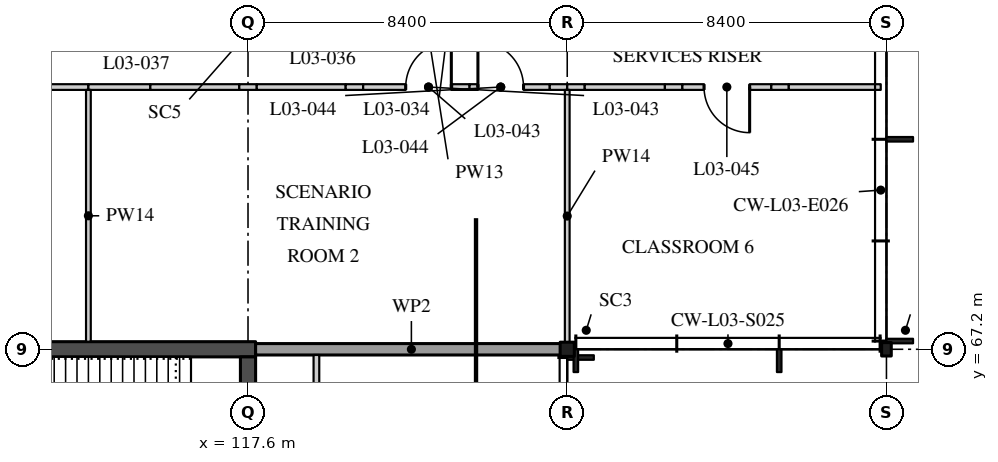
"""IFC4 building model, lengths in metres.
Left out: names, types, materials, properties, quantities, classifications, styles, units other than length and angle.
Written with IfcOpenShell. Run it as: python <this file> out.ifc"""

import sys

from ifc_helpers import new_model, si_unit, direction, frame, frame_2d, origin, origin_2d, place, context, subcontext, project, spatial, rectangle, i_section, extrude, element, fill, save


model = new_model("IFC4")
c1 = context("Model", 3, precision=1e-05, world=origin(), true_north=direction((0.0, 1.0)))
c2 = subcontext(c1, "Body", "Model", "MODEL_VIEW")
j1 = project(units=[si_unit("LENGTHUNIT", "METRE"), si_unit("PLANEANGLEUNIT", "RADIAN")], contexts=[c1])
p1 = place(None, origin())
s1 = spatial("IfcSite", under=j1, at=p1, CompositionType="ELEMENT")
p2 = place(p1, origin())
s2 = spatial("IfcBuilding", under=s1, at=p2, CompositionType="ELEMENT")
p3 = place(p2, frame((0.0, 0.0, 14.4)))
s3 = spatial("IfcBuildingStorey", under=s2, at=p3, CompositionType="ELEMENT", Elevation=14.4)
p4 = place(p3, frame((126.0, 67.2, 0.0), z_axis=(0.0, 0.0, 1.0), x_axis=(1.0, 0.0, 0.0)))
e1 = element("IfcColumn", 1, at=p4, inside=s3, PredefinedType="COLUMN", context=c2, shape_type="SweptSolid", body=[
    extrude(i_section(OverallWidth=0.373, OverallDepth=0.373, WebThickness=0.016, FlangeThickness=0.026, FilletRadius=0.015, at=origin_2d()), origin(), (0.0, 0.0, 1.0), 4.37),
])
p5 = place(p3, frame((134.4, 67.2, 0.0), z_axis=(0.0, 0.0, 1.0), x_axis=(1.0, 0.0, 0.0)))
e2 = element("IfcColumn", 2, at=p5, inside=s3, PredefinedType="COLUMN", context=c2, shape_type="SweptSolid", body=[
    extrude(i_section(OverallWidth=0.254, OverallDepth=0.353, WebThickness=0.01, FlangeThickness=0.016, FilletRadius=0.015, at=origin_2d()), origin(), (0.0, 0.0, 1.0), 4.37),
])
p6 = place(p3, frame((109.0, 67.2, 0.0), z_axis=(0.0, 0.0, 1.0), x_axis=(1.0, 0.0, 0.0)))
e3 = element("IfcWall", 3, at=p6, inside=s3, PredefinedType="SHEAR", context=c2, shape_type="SweptSolid", body=[
    extrude(rectangle(XDim=8.8, YDim=0.4, at=frame_2d((4.4, 0.0))), origin(), (0.0, 0.0, 1.0), 4.37),
])
p7 = place(p3, frame((117.6, 59.0, 0.0), z_axis=(0.0, 0.0, 1.0), x_axis=(0.0, 1.0, 0.0)))
e4 = element("IfcWall", 4, at=p7, inside=s3, PredefinedType="SHEAR", context=c2, shape_type="SweptSolid", body=[
    extrude(rectangle(XDim=8.0, YDim=0.4, at=frame_2d((4.0, 0.0))), origin(), (0.0, 0.0, 1.0), 4.37),
])
p8 = place(p7, frame((2.925, 0.0, 0.0)))
e5 = element("IfcOpeningElement", 5, at=p8, cuts=e4, PredefinedType="OPENING", context=c2, shape_type="SweptSolid", body=[
    extrude(rectangle(XDim=1.2, YDim=2.1, at=frame_2d((0.6, 1.05))), frame((0.0, 0.21, 0.0), z_axis=(0.0, -1.0, 0.0), x_axis=(1.0, 0.0, 0.0)), (0.0, 0.0, 1.0), 0.42),
])
p9 = place(p3, frame((119.4, 59.03, 0.0), z_axis=(0.0, 0.0, 1.0), x_axis=(0.0, 1.0, 0.0)))
e6 = element("IfcWall", 6, at=p9, inside=s3, PredefinedType="PARTITIONING", context=c2, shape_type="SweptSolid", body=[
    extrude(rectangle(XDim=8.02, YDim=0.15, at=frame_2d((4.01, 0.0))), origin(), (0.0, 0.0, 1.0), 4.37),
])
p10 = place(p9, frame((0.17, 0.0, 0.0)))
e7 = element("IfcOpeningElement", 7, at=p10, cuts=e6, PredefinedType="OPENING", context=c2, shape_type="SweptSolid", body=[
    extrude(rectangle(XDim=1.35, YDim=2.1, at=frame_2d((0.675, 1.05))), frame((0.0, 0.085, 0.0), z_axis=(0.0, -1.0, 0.0), x_axis=(1.0, 0.0, 0.0)), (0.0, 0.0, 1.0), 0.17),
])
p11 = place(p3, frame((111.77, 74.1, 0.0), z_axis=(0.0, 0.0, 1.0), x_axis=(1.0, 0.0, 0.0)))
e8 = element("IfcWall", 8, at=p11, inside=s3, PredefinedType="PARTITIONING", context=c2, shape_type="SweptSolid", body=[
    extrude(rectangle(XDim=1.63, YDim=0.15, at=frame_2d((0.815, 0.0))), origin(), (0.0, 0.0, 1.0), 3.895),
])
p12 = place(p3, frame((113.4, 74.1, 0.0), z_axis=(0.0, 0.0, 1.0), x_axis=(1.0, 0.0, 0.0)))
e9 = element("IfcWall", 9, at=p12, inside=s3, PredefinedType="PARTITIONING", context=c2, shape_type="SweptSolid", body=[
    extrude(rectangle(XDim=1.63, YDim=0.15, at=frame_2d((0.815, 0.0))), origin(), (0.0, 0.0, 1.0), 3.895),
])
p13 = place(p3, frame((115.03, 74.1, 0.0), z_axis=(0.0, 0.0, 1.0), x_axis=(1.0, 0.0, 0.0)))
e10 = element("IfcWall", 10, at=p13, inside=s3, PredefinedType="PARTITIONING", context=c2, shape_type="SweptSolid", body=[
    extrude(rectangle(XDim=2.34, YDim=0.15, at=frame_2d((1.17, 0.0))), origin(), (0.0, 0.0, 1.0), 4.37),
])
p14 = place(p3, frame((117.37, 74.1, 0.0), z_axis=(0.0, 0.0, 1.0), x_axis=(1.0, 0.0, 0.0)))
e11 = element("IfcWall", 11, at=p14, inside=s3, PredefinedType="PARTITIONING", context=c2, shape_type="SweptSolid", body=[
    extrude(rectangle(XDim=0.46, YDim=0.15, at=frame_2d((0.23, 0.0))), origin(), (0.0, 0.0, 1.0), 3.746),
])
p15 = place(p3, frame((117.83, 74.1, 0.0), z_axis=(0.0, 0.0, 1.0), x_axis=(1.0, 0.0, 0.0)))
e12 = element("IfcWall", 12, at=p15, inside=s3, PredefinedType="PARTITIONING", context=c2, shape_type="SweptSolid", body=[
    extrude(rectangle(XDim=2.34, YDim=0.15, at=frame_2d((1.17, 0.0))), origin(), (0.0, 0.0, 1.0), 4.37),
])
p16 = place(p3, frame((120.17, 74.1, 0.0), z_axis=(0.0, 0.0, 1.0), x_axis=(1.0, 0.0, 0.0)))
e13 = element("IfcWall", 13, at=p16, inside=s3, PredefinedType="PARTITIONING", context=c2, shape_type="SweptSolid", body=[
    extrude(rectangle(XDim=0.46, YDim=0.15, at=frame_2d((0.23, 0.0))), origin(), (0.0, 0.0, 1.0), 3.895),
])
p17 = place(p3, frame((120.63, 74.1, 0.0), z_axis=(0.0, 0.0, 1.0), x_axis=(1.0, 0.0, 0.0)))
e14 = element("IfcWall", 14, at=p17, inside=s3, PredefinedType="PARTITIONING", context=c2, shape_type="SweptSolid", body=[
    extrude(rectangle(XDim=2.34, YDim=0.15, at=frame_2d((1.17, 0.0))), origin(), (0.0, 0.0, 1.0), 4.37),
])
p18 = place(p17, frame((1.12, 0.0, 0.0)))
e15 = element("IfcOpeningElement", 15, at=p18, cuts=e14, PredefinedType="OPENING", context=c2, shape_type="SweptSolid", body=[
    extrude(rectangle(XDim=1.2, YDim=2.4, at=frame_2d((0.6, 1.2))), frame((0.0, 0.085, 0.0), z_axis=(0.0, -1.0, 0.0), x_axis=(1.0, 0.0, 0.0)), (0.0, 0.0, 1.0), 0.17),
])
p19 = place(p3, frame((122.97, 74.1, 0.0), z_axis=(0.0, 0.0, 1.0), x_axis=(1.0, 0.0, 0.0)))
e16 = element("IfcWall", 16, at=p19, inside=s3, PredefinedType="PARTITIONING", context=c2, shape_type="SweptSolid", body=[
    extrude(rectangle(XDim=0.46, YDim=0.15, at=frame_2d((0.23, 0.0))), origin(), (0.0, 0.0, 1.0), 3.895),
])
p20 = place(p3, frame((123.43, 74.1, 0.0), z_axis=(0.0, 0.0, 1.0), x_axis=(1.0, 0.0, 0.0)))
e17 = element("IfcWall", 17, at=p20, inside=s3, PredefinedType="PARTITIONING", context=c2, shape_type="SweptSolid", body=[
    extrude(rectangle(XDim=2.11, YDim=0.15, at=frame_2d((1.055, 0.0))), origin(), (0.0, 0.0, 1.0), 4.37),
])
p21 = place(p20, frame((0.22, 0.0, 0.0)))
e18 = element("IfcOpeningElement", 18, at=p21, cuts=e17, PredefinedType="OPENING", context=c2, shape_type="SweptSolid", body=[
    extrude(rectangle(XDim=1.2, YDim=2.4, at=frame_2d((0.6, 1.2))), frame((0.0, 0.085, 0.0), z_axis=(0.0, -1.0, 0.0), x_axis=(1.0, 0.0, 0.0)), (0.0, 0.0, 1.0), 0.17),
])
for number, where, z_axis, x_axis in (
    (19, (125.54, 74.1, 0.0), (0.0, 0.0, 1.0), (1.0, 0.0, 0.0)),
    (20, (126.0, 74.1, 0.0), (0.0, 0.0, 1.0), (1.0, 0.0, 0.0)),
):
    element("IfcWall", number, at=place(p3, frame(where, z_axis=z_axis, x_axis=x_axis)), inside=s3, PredefinedType="PARTITIONING", context=c2, shape_type="SweptSolid", body=[
        extrude(rectangle(XDim=0.46, YDim=0.15, at=frame_2d((0.23, 0.0))), origin(), (0.0, 0.0, 1.0), 3.746),
    ])
p22 = place(p3, frame((126.46, 74.1, 0.0), z_axis=(0.0, 0.0, 1.0), x_axis=(1.0, 0.0, 0.0)))
e21 = element("IfcWall", 21, at=p22, inside=s3, PredefinedType="PARTITIONING", context=c2, shape_type="SweptSolid", body=[
    extrude(rectangle(XDim=2.11, YDim=0.15, at=frame_2d((1.055, 0.0))), origin(), (0.0, 0.0, 1.0), 4.37),
])
p23 = place(p3, frame((128.57, 74.1, 0.0), z_axis=(0.0, 0.0, 1.0), x_axis=(1.0, 0.0, 0.0)))
e22 = element("IfcWall", 22, at=p23, inside=s3, PredefinedType="PARTITIONING", context=c2, shape_type="SweptSolid", body=[
    extrude(rectangle(XDim=0.46, YDim=0.15, at=frame_2d((0.23, 0.0))), origin(), (0.0, 0.0, 1.0), 3.895),
])
p24 = place(p3, frame((129.03, 74.1, 0.0), z_axis=(0.0, 0.0, 1.0), x_axis=(1.0, 0.0, 0.0)))
e23 = element("IfcWall", 23, at=p24, inside=s3, PredefinedType="PARTITIONING", context=c2, shape_type="SweptSolid", body=[
    extrude(rectangle(XDim=2.34, YDim=0.15, at=frame_2d((1.17, 0.0))), origin(), (0.0, 0.0, 1.0), 4.37),
])
p25 = place(p24, frame((0.57, 0.0, 0.0)))
e24 = element("IfcOpeningElement", 24, at=p25, cuts=e23, PredefinedType="OPENING", context=c2, shape_type="SweptSolid", body=[
    extrude(rectangle(XDim=1.2, YDim=2.4, at=frame_2d((0.6, 1.2))), frame((0.0, 0.085, 0.0), z_axis=(0.0, -1.0, 0.0), x_axis=(1.0, 0.0, 0.0)), (0.0, 0.0, 1.0), 0.17),
])
p26 = place(p3, frame((131.37, 74.1, 0.0), z_axis=(0.0, 0.0, 1.0), x_axis=(1.0, 0.0, 0.0)))
e25 = element("IfcWall", 25, at=p26, inside=s3, PredefinedType="PARTITIONING", context=c2, shape_type="SweptSolid", body=[
    extrude(rectangle(XDim=0.46, YDim=0.15, at=frame_2d((0.23, 0.0))), origin(), (0.0, 0.0, 1.0), 3.895),
])
p27 = place(p3, frame((131.83, 74.1, 0.0), z_axis=(0.0, 0.0, 1.0), x_axis=(1.0, 0.0, 0.0)))
e26 = element("IfcWall", 26, at=p27, inside=s3, PredefinedType="PARTITIONING", context=c2, shape_type="SweptSolid", body=[
    extrude(rectangle(XDim=2.42, YDim=0.15, at=frame_2d((1.21, 0.0))), origin(), (0.0, 0.0, 1.0), 4.37),
])
p28 = place(p3, frame((113.4, 67.4, 0.0), z_axis=(0.0, 0.0, 1.0), x_axis=(0.0, 1.0, 0.0)))
e27 = element("IfcWall", 27, at=p28, inside=s3, PredefinedType="PARTITIONING", context=c2, shape_type="SweptSolid", body=[
    extrude(rectangle(XDim=6.625, YDim=0.125, at=frame_2d((3.312, 0.0))), origin(), (0.0, 0.0, 1.0), 4.37),
])
p29 = place(p3, frame((126.0, 67.386, 0.0), z_axis=(0.0, 0.0, 1.0), x_axis=(0.0, 1.0, 0.0)))
e28 = element("IfcWall", 28, at=p29, inside=s3, PredefinedType="PARTITIONING", context=c2, shape_type="SweptSolid", body=[
    extrude(rectangle(XDim=6.639, YDim=0.125, at=frame_2d((3.319, 0.0))), origin(), (0.0, 0.0, 1.0), 3.746),
])
p30 = place(p3, frame((125.998, 67.2, 0.0), z_axis=(0.0, 0.0, 1.0), x_axis=(-1.0, 0.0, 0.0)))
e29 = element("IfcWall", 29, at=p30, inside=s3, PredefinedType="SOLIDWALL", context=c2, shape_type="SweptSolid", body=[
    extrude(rectangle(XDim=8.198, YDim=0.3, at=frame_2d((4.099, 0.0))), origin(), (0.0, 0.0, 1.0), 3.746),
])
p31 = place(p18, origin())
e30 = element("IfcDoor", 30, at=p31, inside=s3, OperationType="SINGLE_SWING_LEFT", PredefinedType="DOOR", context=c2, shape_type="SweptSolid", body=[
    extrude(rectangle(XDim=1.2, YDim=2.4, at=frame_2d((0.6, 1.2))), frame((0.0, 0.025, 0.0), z_axis=(0.0, -1.0, 0.0), x_axis=(1.0, 0.0, 0.0)), (0.0, 0.0, 1.0), 0.05),
])
fill(e15, e30)
p32 = place(p21, origin())
e31 = element("IfcDoor", 31, at=p32, inside=s3, OperationType="SINGLE_SWING_RIGHT", PredefinedType="DOOR", context=c2, shape_type="SweptSolid", body=[
    extrude(rectangle(XDim=1.2, YDim=2.4, at=frame_2d((0.6, 1.2))), frame((0.0, 0.025, 0.0), z_axis=(0.0, -1.0, 0.0), x_axis=(1.0, 0.0, 0.0)), (0.0, 0.0, 1.0), 0.05),
])
fill(e18, e31)
p33 = place(p25, frame((1.2, 0.0, 0.0), z_axis=(0.0, 0.0, 1.0), x_axis=(-1.0, 0.0, 0.0)))
e32 = element("IfcDoor", 32, at=p33, inside=s3, OperationType="SINGLE_SWING_RIGHT", PredefinedType="DOOR", context=c2, shape_type="SweptSolid", body=[
    extrude(rectangle(XDim=1.2, YDim=2.4, at=frame_2d((0.6, 1.2))), frame((0.0, 0.025, 0.0), z_axis=(0.0, -1.0, 0.0), x_axis=(1.0, 0.0, 0.0)), (0.0, 0.0, 1.0), 0.05),
])
fill(e24, e32)
save(model, sys.argv[1])
